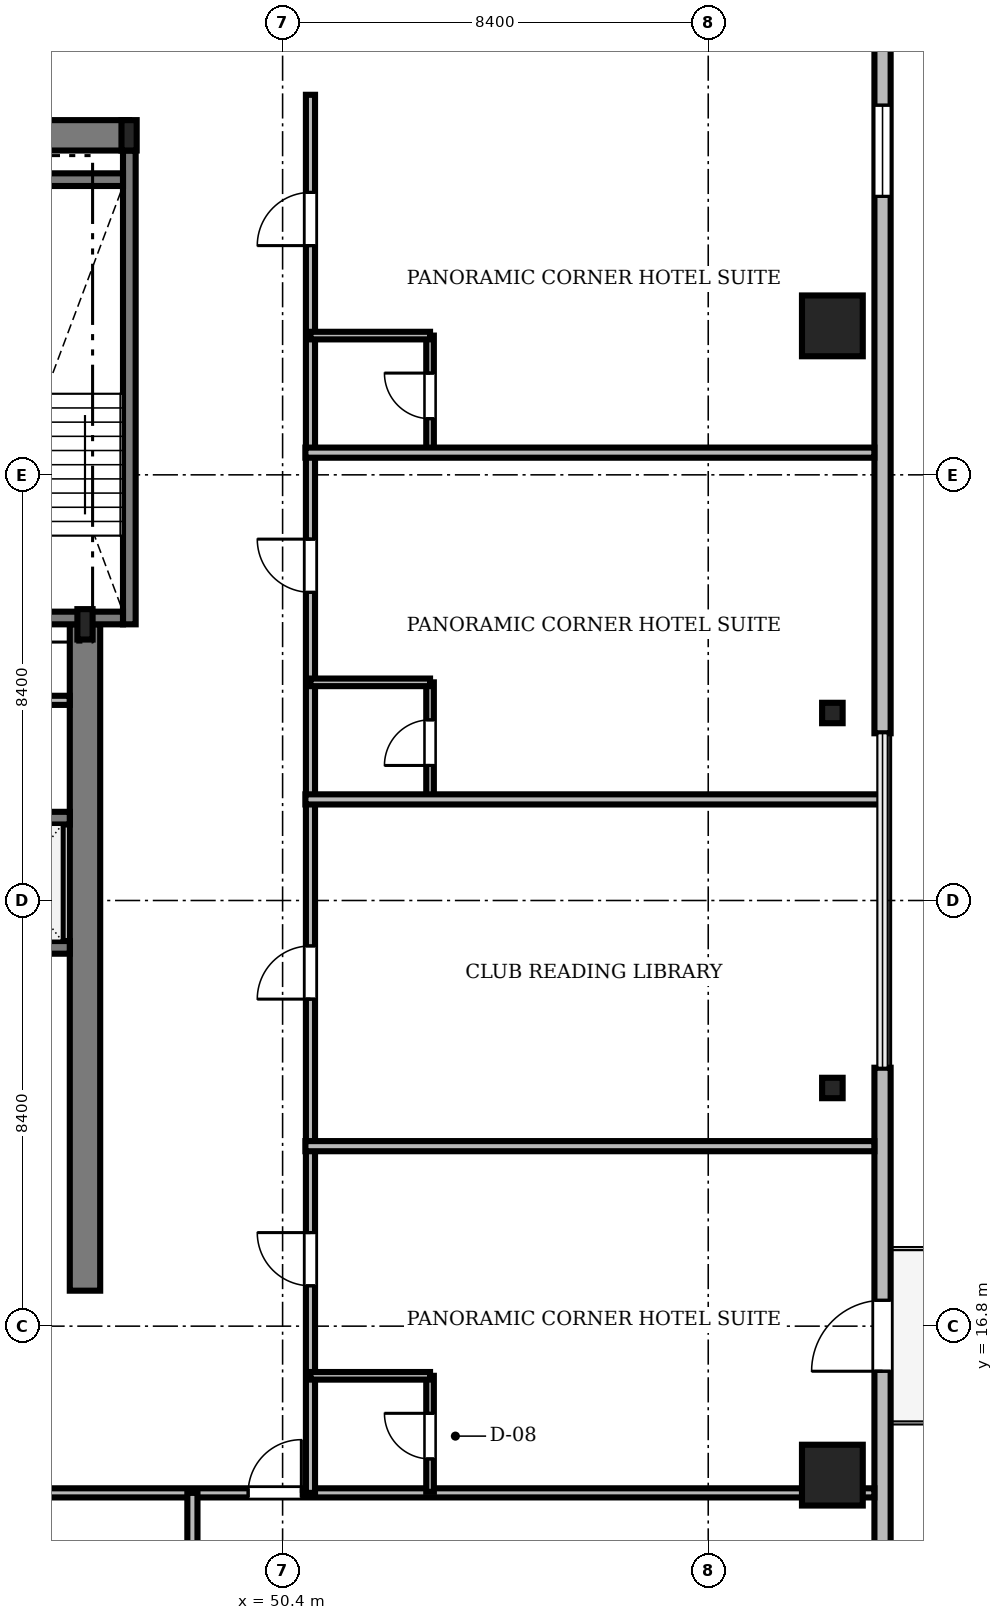
"""IFC4 building model, lengths in metres.
Left out: names, types, materials, properties, quantities, classifications, styles, units other than length and angle.
Written with IfcOpenShell. Run it as: python <this file> out.ifc"""

import sys

from ifc_helpers import new_model, si_unit, direction, frame, frame_2d, origin, origin_2d, place, context, subcontext, project, spatial, rectangle, i_section, extrude, source, transform, mapped, element, fill, save


model = new_model("IFC4")
c1 = context("Model", 3, precision=1e-05, world=origin(), true_north=direction((0.0, 1.0)))
c2 = subcontext(c1, "Body", "Model", "MODEL_VIEW")
j1 = project(units=[si_unit("LENGTHUNIT", "METRE"), si_unit("PLANEANGLEUNIT", "RADIAN")], contexts=[c1])
p1 = place(None, origin())
s1 = spatial("IfcSite", under=j1, at=p1, CompositionType="ELEMENT")
p2 = place(p1, origin())
s2 = spatial("IfcBuilding", under=s1, at=p2, CompositionType="ELEMENT")
p3 = place(p2, frame((0.0, 0.0, 250.6)))
s3 = spatial("IfcBuildingStorey", under=s2, at=p3, CompositionType="ELEMENT", Elevation=250.6)
m1 = source(origin(), c2, "Body", "SweptSolid", [
    extrude(rectangle(XDim=17.52, YDim=0.6, at=frame_2d((8.76, 0.0))), origin(), (0.0, 0.0, 1.0), 3.65),
])
p4 = place(p3, frame((29.85, 40.3, 0.0), z_axis=(0.0, 0.0, 1.0), x_axis=(1.0, 0.0, 0.0)))
e1 = element("IfcWall", 1, at=p4, inside=s3, PredefinedType="SHEAR", context=c2, shape_type="MappedRepresentation", body=[
    mapped(m1, transform((0.0, 0.0, 0.0), scale=1.0)),
])
m2 = source(origin(), c2, "Body", "SweptSolid", [
    extrude(rectangle(XDim=13.15, YDim=0.6, at=frame_2d((6.575, 0.0))), origin(), (0.0, 0.0, 1.0), 3.65),
])
p5 = place(p3, frame((46.5, 17.5, 0.0), z_axis=(0.0, 0.0, 1.0), x_axis=(0.0, 1.0, 0.0)))
e2 = element("IfcWall", 2, at=p5, inside=s3, PredefinedType="SHEAR", context=c2, shape_type="MappedRepresentation", body=[
    mapped(m2, transform((0.0, 0.0, 0.0), scale=1.0)),
])
m3 = source(origin(), c2, "Body", "SweptSolid", [
    extrude(i_section(OverallWidth=0.3, OverallDepth=0.6, WebThickness=0.015, FlangeThickness=0.03, FilletRadius=0.027, at=origin_2d()), origin(), (0.0, 0.0, 1.0), 3.65),
])
for number, where, z_axis, x_axis in (
    (3, (46.5, 30.65, 0.0), (0.0, 0.0, 1.0), (1.0, 0.0, 0.0)),
    (4, (47.37, 40.3, 0.0), (0.0, 0.0, 1.0), (1.0, 0.0, 0.0)),
):
    element("IfcColumn", number, at=place(p3, frame(where, z_axis=z_axis, x_axis=x_axis)), inside=s3, PredefinedType="COLUMN", context=c2, shape_type="MappedRepresentation", body=[
        mapped(m3, transform((0.0, 0.0, 0.0), scale=1.0)),
    ])
m4 = source(origin(), c2, "Body", "SweptSolid", [
    extrude(rectangle(XDim=1.2, YDim=1.2, at=origin_2d()), origin(), (0.0, 0.0, 1.0), 3.65),
])
for number, where, z_axis, x_axis in (
    (5, (61.25, 13.86, 0.0), (0.0, 0.0, 1.0), (1.0, 0.0, 0.0)),
    (6, (61.25, 36.54, 0.0), (0.0, 0.0, 1.0), (1.0, 0.0, 0.0)),
):
    element("IfcColumn", number, at=place(p3, frame(where, z_axis=z_axis, x_axis=x_axis)), inside=s3, PredefinedType="COLUMN", context=c2, shape_type="MappedRepresentation", body=[
        mapped(m4, transform((0.0, 0.0, 0.0), scale=1.0)),
    ])
m5 = source(origin(), c2, "Body", "SweptSolid", [
    extrude(i_section(OverallWidth=0.405, OverallDepth=0.403, WebThickness=0.018, FlangeThickness=0.028, FilletRadius=0.015, at=origin_2d()), origin(), (0.0, 0.0, 1.0), 3.65),
])
for number, where, z_axis, x_axis in (
    (7, (61.25, 21.5, 0.0), (0.0, 0.0, 1.0), (1.0, 0.0, 0.0)),
    (8, (61.25, 28.9, 0.0), (0.0, 0.0, 1.0), (1.0, 0.0, 0.0)),
):
    element("IfcColumn", number, at=place(p3, frame(where, z_axis=z_axis, x_axis=x_axis)), inside=s3, PredefinedType="COLUMN", context=c2, shape_type="MappedRepresentation", body=[
        mapped(m5, transform((0.0, 0.0, 0.0), scale=1.0)),
    ])
m6 = source(origin(), c2, "Body", "SweptSolid", [
    extrude(rectangle(XDim=15.6, YDim=0.32, at=frame_2d((7.8, 0.0))), origin(), (0.0, 0.0, 1.0), 3.65),
])
p6 = place(p3, frame((62.24, 6.3, 0.0), z_axis=(0.0, 0.0, 1.0), x_axis=(0.0, 1.0, 0.0)))
e9 = element("IfcWall", 9, at=p6, inside=s3, PredefinedType="SOLIDWALL", context=c2, shape_type="MappedRepresentation", body=[
    mapped(m6, transform((0.0, 0.0, 0.0), scale=1.0)),
])
m7 = source(origin(), c2, "Body", "SweptSolid", [
    extrude(rectangle(XDim=1.4, YDim=2.3, at=frame_2d((0.7, 1.15))), frame((0.0, 0.17, 0.0), z_axis=(0.0, -1.0, 0.0), x_axis=(1.0, 0.0, 0.0)), (0.0, 0.0, 1.0), 0.34),
])
p7 = place(p6, frame((9.61, 0.0, 0.0)))
e10 = element("IfcOpeningElement", 10, at=p7, cuts=e9, PredefinedType="OPENING", context=c2, shape_type="MappedRepresentation", body=[
    mapped(m7, transform((0.0, 0.0, 0.0), scale=1.0)),
])
m8 = source(origin(), c2, "Body", "SweptSolid", [
    extrude(rectangle(XDim=1.8, YDim=2.4, at=frame_2d((0.9, 1.2))), frame((0.0, 0.17, 0.0), z_axis=(0.0, -1.0, 0.0), x_axis=(1.0, 0.0, 0.0)), (0.0, 0.0, 1.0), 0.34),
])
p8 = place(p6, frame((3.205, 0.0, 0.72)))
e11 = element("IfcOpeningElement", 11, at=p8, cuts=e9, PredefinedType="OPENING", context=c2, shape_type="MappedRepresentation", body=[
    mapped(m8, transform((0.0, 0.0, 0.0), scale=1.0)),
])
m9 = source(origin(), c2, "Body", "SweptSolid", [
    extrude(rectangle(XDim=15.6, YDim=0.32, at=frame_2d((7.8, 0.0))), origin(), (0.0, 0.0, 1.0), 3.65),
])
p9 = place(p3, frame((62.24, 28.5, 0.0), z_axis=(0.0, 0.0, 1.0), x_axis=(0.0, 1.0, 0.0)))
e12 = element("IfcWall", 12, at=p9, inside=s3, PredefinedType="SOLIDWALL", context=c2, shape_type="MappedRepresentation", body=[
    mapped(m9, transform((0.0, 0.0, 0.0), scale=1.0)),
])
p10 = place(p9, frame((10.595, 0.0, 0.72)))
e13 = element("IfcOpeningElement", 13, at=p10, cuts=e12, PredefinedType="OPENING", context=c2, shape_type="MappedRepresentation", body=[
    mapped(m8, transform((0.0, 0.0, 0.0), scale=1.0)),
])
m10 = source(origin(), c2, "Body", "SweptSolid", [
    extrude(rectangle(XDim=9.35, YDim=0.25, at=frame_2d((4.675, 0.0))), origin(), (0.0, 0.0, 1.0), 3.75),
])
p11 = place(p3, frame((47.375, 30.65, 0.0), z_axis=(0.0, 0.0, 1.0), x_axis=(0.0, 1.0, 0.0)))
e14 = element("IfcWall", 14, at=p11, inside=s3, PredefinedType="SOLIDWALL", context=c2, shape_type="MappedRepresentation", body=[
    mapped(m10, transform((0.0, 0.0, 0.0), scale=1.0)),
])
m11 = source(origin(), c2, "Body", "SweptSolid", [
    extrude(rectangle(XDim=3.15, YDim=0.25, at=frame_2d((1.575, 0.0))), origin(), (0.0, 0.0, 1.0), 3.75),
])
p12 = place(p3, frame((44.1, 39.425, 0.0), z_axis=(0.0, 0.0, 1.0), x_axis=(1.0, 0.0, 0.0)))
e15 = element("IfcWall", 15, at=p12, inside=s3, PredefinedType="SOLIDWALL", context=c2, shape_type="MappedRepresentation", body=[
    mapped(m11, transform((0.0, 0.0, 0.0), scale=1.0)),
])
p13 = place(p3, frame((44.1, 30.775, 0.0), z_axis=(0.0, 0.0, 1.0), x_axis=(1.0, 0.0, 0.0)))
e16 = element("IfcWall", 16, at=p13, inside=s3, PredefinedType="SOLIDWALL", context=c2, shape_type="MappedRepresentation", body=[
    mapped(m11, transform((0.0, 0.0, 0.0), scale=1.0)),
])
m12 = source(origin(), c2, "Body", "SweptSolid", [
    extrude(rectangle(XDim=1.1, YDim=2.2, at=frame_2d((0.55, 1.1))), frame((0.0, 0.135, 0.0), z_axis=(0.0, -1.0, 0.0), x_axis=(1.0, 0.0, 0.0)), (0.0, 0.0, 1.0), 0.27),
])
p14 = place(p13, frame((0.35, 0.0, 0.0)))
e17 = element("IfcOpeningElement", 17, at=p14, cuts=e16, PredefinedType="OPENING", context=c2, shape_type="MappedRepresentation", body=[
    mapped(m12, transform((0.0, 0.0, 0.0), scale=1.0)),
])
m13 = source(origin(), c2, "Body", "SweptSolid", [
    extrude(rectangle(XDim=2.2, YDim=0.25, at=frame_2d((1.1, 0.0))), origin(), (0.0, 0.0, 1.0), 3.65),
])
p15 = place(p3, frame((44.0, 24.275, 0.0), z_axis=(0.0, 0.0, 1.0), x_axis=(1.0, 0.0, 0.0)))
e18 = element("IfcWall", 18, at=p15, inside=s3, PredefinedType="SOLIDWALL", context=c2, shape_type="MappedRepresentation", body=[
    mapped(m13, transform((0.0, 0.0, 0.0), scale=1.0)),
])
p16 = place(p3, frame((44.0, 26.825, 0.0), z_axis=(0.0, 0.0, 1.0), x_axis=(1.0, 0.0, 0.0)))
e19 = element("IfcWall", 19, at=p16, inside=s3, PredefinedType="SOLIDWALL", context=c2, shape_type="MappedRepresentation", body=[
    mapped(m13, transform((0.0, 0.0, 0.0), scale=1.0)),
])
m14 = source(origin(), c2, "Body", "SweptSolid", [
    extrude(rectangle(XDim=1.3, YDim=2.3, at=frame_2d((0.65, 1.15))), frame((0.0, 0.135, 0.0), z_axis=(0.0, -1.0, 0.0), x_axis=(1.0, 0.0, 0.0)), (0.0, 0.0, 1.0), 0.27),
])
p17 = place(p16, frame((0.45, 0.0, 0.0)))
e20 = element("IfcOpeningElement", 20, at=p17, cuts=e19, PredefinedType="OPENING", context=c2, shape_type="MappedRepresentation", body=[
    mapped(m14, transform((0.0, 0.0, 0.0), scale=1.0)),
])
m15 = source(origin(), c2, "Body", "SweptSolid", [
    extrude(rectangle(XDim=46.156, YDim=0.18, at=frame_2d((23.078, 0.0))), origin(), (0.0, 0.0, 1.0), 2.892),
])
p18 = place(p3, frame((15.922, 13.51, 0.0), z_axis=(0.0, 0.0, 1.0), x_axis=(1.0, 0.0, 0.0)))
e21 = element("IfcWall", 21, at=p18, inside=s3, PredefinedType="PARTITIONING", context=c2, shape_type="MappedRepresentation", body=[
    mapped(m15, transform((0.0, 0.0, 0.0), scale=1.0)),
])
m16 = source(origin(), c2, "Body", "SweptSolid", [
    extrude(rectangle(XDim=1.05, YDim=2.2, at=frame_2d((0.525, 1.1))), frame((0.0, 0.1, 0.0), z_axis=(0.0, -1.0, 0.0), x_axis=(1.0, 0.0, 0.0)), (0.0, 0.0, 1.0), 0.2),
])
p19 = place(p18, frame((7.298, 0.0, 0.0)))
e22 = element("IfcOpeningElement", 22, at=p19, cuts=e21, PredefinedType="OPENING", context=c2, shape_type="MappedRepresentation", body=[
    mapped(m16, transform((0.0, 0.0, 0.0), scale=1.0)),
])
p20 = place(p18, frame((10.384, 0.0, 0.0)))
e23 = element("IfcOpeningElement", 23, at=p20, cuts=e21, PredefinedType="OPENING", context=c2, shape_type="MappedRepresentation", body=[
    mapped(m16, transform((0.0, 0.0, 0.0), scale=1.0)),
])
p21 = place(p18, frame((15.647, 0.0, 0.0)))
e24 = element("IfcOpeningElement", 24, at=p21, cuts=e21, PredefinedType="OPENING", context=c2, shape_type="MappedRepresentation", body=[
    mapped(m16, transform((0.0, 0.0, 0.0), scale=1.0)),
])
p22 = place(p18, frame((21.659, 0.0, 0.0)))
e25 = element("IfcOpeningElement", 25, at=p22, cuts=e21, PredefinedType="OPENING", context=c2, shape_type="MappedRepresentation", body=[
    mapped(m16, transform((0.0, 0.0, 0.0), scale=1.0)),
])
p23 = place(p18, frame((28.422, 0.0, 0.0)))
e26 = element("IfcOpeningElement", 26, at=p23, cuts=e21, PredefinedType="OPENING", context=c2, shape_type="MappedRepresentation", body=[
    mapped(m16, transform((0.0, 0.0, 0.0), scale=1.0)),
])
p24 = place(p18, frame((33.798, 0.0, 0.0)))
e27 = element("IfcOpeningElement", 27, at=p24, cuts=e21, PredefinedType="OPENING", context=c2, shape_type="MappedRepresentation", body=[
    mapped(m16, transform((0.0, 0.0, 0.0), scale=1.0)),
])
m17 = source(origin(), c2, "Body", "SweptSolid", [
    extrude(rectangle(XDim=27.59, YDim=0.18, at=frame_2d((13.795, 0.0))), origin(), (0.0, 0.0, 1.0), 3.092),
])
p25 = place(p3, frame((50.95, 13.51, 0.0), z_axis=(0.0, 0.0, 1.0), x_axis=(0.0, 1.0, 0.0)))
e28 = element("IfcWall", 28, at=p25, inside=s3, PredefinedType="PARTITIONING", context=c2, shape_type="MappedRepresentation", body=[
    mapped(m17, transform((0.0, 0.0, 0.0), scale=1.0)),
])
p26 = place(p25, frame((4.086, 0.0, 0.0)))
e29 = element("IfcOpeningElement", 29, at=p26, cuts=e28, PredefinedType="OPENING", context=c2, shape_type="MappedRepresentation", body=[
    mapped(m16, transform((0.0, 0.0, 0.0), scale=1.0)),
])
p27 = place(p25, frame((9.744, 0.0, 0.0)))
e30 = element("IfcOpeningElement", 30, at=p27, cuts=e28, PredefinedType="OPENING", context=c2, shape_type="MappedRepresentation", body=[
    mapped(m16, transform((0.0, 0.0, 0.0), scale=1.0)),
])
p28 = place(p25, frame((17.771, 0.0, 0.0)))
e31 = element("IfcOpeningElement", 31, at=p28, cuts=e28, PredefinedType="OPENING", context=c2, shape_type="MappedRepresentation", body=[
    mapped(m16, transform((0.0, 0.0, 0.0), scale=1.0)),
])
p29 = place(p25, frame((24.614, 0.0, 0.0)))
e32 = element("IfcOpeningElement", 32, at=p29, cuts=e28, PredefinedType="OPENING", context=c2, shape_type="MappedRepresentation", body=[
    mapped(m16, transform((0.0, 0.0, 0.0), scale=1.0)),
])
m18 = source(origin(), c2, "Body", "SweptSolid", [
    extrude(rectangle(XDim=4.648, YDim=0.18, at=frame_2d((2.324, 0.0))), origin(), (0.0, 0.0, 1.0), 3.282),
])
p30 = place(p3, frame((41.55, 29.15, 0.0), z_axis=(0.0, 0.0, 1.0), x_axis=(1.0, 0.0, 0.0)))
e33 = element("IfcWall", 33, at=p30, inside=s3, PredefinedType="PARTITIONING", context=c2, shape_type="MappedRepresentation", body=[
    mapped(m18, transform((0.0, 0.0, 0.0), scale=1.0)),
])
m19 = source(origin(), c2, "Body", "SweptSolid", [
    extrude(rectangle(XDim=1.2, YDim=2.2, at=frame_2d((0.6, 1.1))), frame((0.0, 0.1, 0.0), z_axis=(0.0, -1.0, 0.0), x_axis=(1.0, 0.0, 0.0)), (0.0, 0.0, 1.0), 0.2),
])
p31 = place(p30, frame((1.6, 0.0, 0.0)))
e34 = element("IfcOpeningElement", 34, at=p31, cuts=e33, PredefinedType="OPENING", context=c2, shape_type="MappedRepresentation", body=[
    mapped(m19, transform((0.0, 0.0, 0.0), scale=1.0)),
])
m20 = source(origin(), c2, "Body", "SweptSolid", [
    extrude(rectangle(XDim=2.29, YDim=0.15, at=frame_2d((1.145, 0.0))), origin(), (0.0, 0.0, 1.0), 3.092),
])
p32 = place(p3, frame((53.31, 13.53, 0.0), z_axis=(0.0, 0.0, 1.0), x_axis=(0.0, 1.0, 0.0)))
e35 = element("IfcWall", 35, at=p32, inside=s3, PredefinedType="PARTITIONING", context=c2, shape_type="MappedRepresentation", body=[
    mapped(m20, transform((0.0, 0.0, 0.0), scale=1.0)),
])
m21 = source(origin(), c2, "Body", "SweptSolid", [
    extrude(rectangle(XDim=0.9, YDim=2.1, at=frame_2d((0.45, 1.05))), frame((0.0, 0.085, 0.0), z_axis=(0.0, -1.0, 0.0), x_axis=(1.0, 0.0, 0.0)), (0.0, 0.0, 1.0), 0.17),
])
p33 = place(p32, frame((0.65, 0.0, 0.0)))
e36 = element("IfcOpeningElement", 36, at=p33, cuts=e35, PredefinedType="OPENING", context=c2, shape_type="MappedRepresentation", body=[
    mapped(m21, transform((0.0, 0.0, 0.0), scale=1.0)),
])
m22 = source(origin(), c2, "Body", "SweptSolid", [
    extrude(rectangle(XDim=2.29, YDim=0.15, at=frame_2d((1.145, 0.0))), origin(), (0.0, 0.0, 1.0), 3.65),
])
p34 = place(p3, frame((53.31, 27.215, 0.0), z_axis=(0.0, 0.0, 1.0), x_axis=(0.0, 1.0, 0.0)))
e37 = element("IfcWall", 37, at=p34, inside=s3, PredefinedType="PARTITIONING", context=c2, shape_type="MappedRepresentation", body=[
    mapped(m22, transform((0.0, 0.0, 0.0), scale=1.0)),
])
p35 = place(p34, frame((0.65, 0.0, 0.0)))
e38 = element("IfcOpeningElement", 38, at=p35, cuts=e37, PredefinedType="OPENING", context=c2, shape_type="MappedRepresentation", body=[
    mapped(m21, transform((0.0, 0.0, 0.0), scale=1.0)),
])
p36 = place(p3, frame((53.31, 34.058, 0.0), z_axis=(0.0, 0.0, 1.0), x_axis=(0.0, 1.0, 0.0)))
e39 = element("IfcWall", 39, at=p36, inside=s3, PredefinedType="PARTITIONING", context=c2, shape_type="MappedRepresentation", body=[
    mapped(m22, transform((0.0, 0.0, 0.0), scale=1.0)),
])
p37 = place(p36, frame((0.65, 0.0, 0.0)))
e40 = element("IfcOpeningElement", 40, at=p37, cuts=e39, PredefinedType="OPENING", context=c2, shape_type="MappedRepresentation", body=[
    mapped(m21, transform((0.0, 0.0, 0.0), scale=1.0)),
])
m23 = source(origin(), c2, "Body", "SweptSolid", [
    extrude(rectangle(XDim=11.388, YDim=0.2, at=frame_2d((5.694, 0.0))), origin(), (0.0, 0.0, 1.0), 2.892),
])
p38 = place(p3, frame((48.62, 2.122, 0.0), z_axis=(0.0, 0.0, 1.0), x_axis=(0.0, 1.0, 0.0)))
e41 = element("IfcWall", 41, at=p38, inside=s3, PredefinedType="PARTITIONING", context=c2, shape_type="MappedRepresentation", body=[
    mapped(m23, transform((0.0, 0.0, 0.0), scale=1.0)),
])
m24 = source(origin(), c2, "Body", "SweptSolid", [
    extrude(rectangle(XDim=11.228, YDim=0.2, at=frame_2d((5.614, 0.0))), origin(), (0.0, 0.0, 1.0), 2.892),
])
p39 = place(p3, frame((50.85, 20.352, 0.0), z_axis=(0.0, 0.0, 1.0), x_axis=(1.0, 0.0, 0.0)))
e42 = element("IfcWall", 42, at=p39, inside=s3, PredefinedType="PARTITIONING", context=c2, shape_type="MappedRepresentation", body=[
    mapped(m24, transform((0.0, 0.0, 0.0), scale=1.0)),
])
m25 = source(origin(), c2, "Body", "SweptSolid", [
    extrude(rectangle(XDim=11.42, YDim=0.2, at=frame_2d((5.71, 0.0))), origin(), (0.0, 0.0, 1.0), 2.892),
])
p40 = place(p3, frame((50.85, 27.195, 0.0), z_axis=(0.0, 0.0, 1.0), x_axis=(1.0, 0.0, 0.0)))
e43 = element("IfcWall", 43, at=p40, inside=s3, PredefinedType="PARTITIONING", context=c2, shape_type="MappedRepresentation", body=[
    mapped(m25, transform((0.0, 0.0, 0.0), scale=1.0)),
])
p41 = place(p3, frame((50.85, 34.038, 0.0), z_axis=(0.0, 0.0, 1.0), x_axis=(1.0, 0.0, 0.0)))
e44 = element("IfcWall", 44, at=p41, inside=s3, PredefinedType="PARTITIONING", context=c2, shape_type="MappedRepresentation", body=[
    mapped(m24, transform((0.0, 0.0, 0.0), scale=1.0)),
])
m26 = source(origin(), c2, "Body", "SweptSolid", [
    extrude(rectangle(XDim=2.36, YDim=0.15, at=frame_2d((1.18, 0.0))), origin(), (0.0, 0.0, 1.0), 3.65),
])
for number, where, z_axis, x_axis in (
    (45, (50.95, 15.82, 0.0), (0.0, 0.0, 1.0), (1.0, 0.0, 0.0)),
    (46, (50.95, 29.505, 0.0), (0.0, 0.0, 1.0), (1.0, 0.0, 0.0)),
    (47, (50.95, 36.348, 0.0), (0.0, 0.0, 1.0), (1.0, 0.0, 0.0)),
):
    element("IfcWall", number, at=place(p3, frame(where, z_axis=z_axis, x_axis=x_axis)), inside=s3, PredefinedType="PARTITIONING", context=c2, shape_type="MappedRepresentation", body=[
        mapped(m26, transform((0.0, 0.0, 0.0), scale=1.0)),
    ])
m27 = source(origin(), c2, "Body", "SweptSolid", [
    extrude(rectangle(XDim=1.4, YDim=2.3, at=frame_2d((0.7, 1.15))), frame((0.0, 0.025, 0.0), z_axis=(0.0, -1.0, 0.0), x_axis=(1.0, 0.0, 0.0)), (0.0, 0.0, 1.0), 0.05),
])
p42 = place(p7, frame((1.4, 0.0, 0.0), z_axis=(0.0, 0.0, 1.0), x_axis=(-1.0, 0.0, 0.0)))
e48 = element("IfcDoor", 48, at=p42, inside=s3, OperationType="DOUBLE_DOOR_SLIDING", PredefinedType="DOOR", context=c2, shape_type="MappedRepresentation", body=[
    mapped(m27, transform((0.0, 0.0, 0.0), scale=1.0)),
])
fill(e10, e48)
m28 = source(origin(), c2, "Body", "SweptSolid", [
    extrude(rectangle(XDim=1.8, YDim=2.4, at=frame_2d((0.9, 1.2))), frame((0.0, 0.03, 0.0), z_axis=(0.0, -1.0, 0.0), x_axis=(1.0, 0.0, 0.0)), (0.0, 0.0, 1.0), 0.06),
])
p43 = place(p10, origin())
e49 = element("IfcWindow", 49, at=p43, inside=s3, PartitioningType="SINGLE_PANEL", PredefinedType="WINDOW", context=c2, shape_type="MappedRepresentation", body=[
    mapped(m28, transform((0.0, 0.0, 0.0), scale=1.0)),
])
fill(e13, e49)
m29 = source(origin(), c2, "Body", "SweptSolid", [
    extrude(rectangle(XDim=1.05, YDim=2.2, at=frame_2d((0.525, 1.1))), frame((0.0, 0.025, 0.0), z_axis=(0.0, -1.0, 0.0), x_axis=(1.0, 0.0, 0.0)), (0.0, 0.0, 1.0), 0.05),
])
p44 = place(p24, origin())
e50 = element("IfcDoor", 50, at=p44, inside=s3, OperationType="SINGLE_SWING_RIGHT", PredefinedType="DOOR", context=c2, shape_type="MappedRepresentation", body=[
    mapped(m29, transform((0.0, 0.0, 0.0), scale=1.0)),
])
fill(e27, e50)
p45 = place(p26, origin())
e51 = element("IfcDoor", 51, at=p45, inside=s3, OperationType="SINGLE_SWING_RIGHT", PredefinedType="DOOR", context=c2, shape_type="MappedRepresentation", body=[
    mapped(m29, transform((0.0, 0.0, 0.0), scale=1.0)),
])
fill(e29, e51)
p46 = place(p27, origin())
e52 = element("IfcDoor", 52, at=p46, inside=s3, OperationType="SINGLE_SWING_LEFT", PredefinedType="DOOR", context=c2, shape_type="MappedRepresentation", body=[
    mapped(m29, transform((0.0, 0.0, 0.0), scale=1.0)),
])
fill(e30, e52)
p47 = place(p28, origin())
e53 = element("IfcDoor", 53, at=p47, inside=s3, OperationType="SINGLE_SWING_RIGHT", PredefinedType="DOOR", context=c2, shape_type="MappedRepresentation", body=[
    mapped(m29, transform((0.0, 0.0, 0.0), scale=1.0)),
])
fill(e31, e53)
p48 = place(p29, origin())
e54 = element("IfcDoor", 54, at=p48, inside=s3, OperationType="SINGLE_SWING_LEFT", PredefinedType="DOOR", context=c2, shape_type="MappedRepresentation", body=[
    mapped(m29, transform((0.0, 0.0, 0.0), scale=1.0)),
])
fill(e32, e54)
m30 = source(origin(), c2, "Body", "SweptSolid", [
    extrude(rectangle(XDim=0.9, YDim=2.1, at=frame_2d((0.45, 1.05))), frame((0.0, 0.025, 0.0), z_axis=(0.0, -1.0, 0.0), x_axis=(1.0, 0.0, 0.0)), (0.0, 0.0, 1.0), 0.05),
])
p49 = place(p33, origin())
e55 = element("IfcDoor", 55, at=p49, inside=s3, OperationType="SINGLE_SWING_RIGHT", PredefinedType="DOOR", context=c2, shape_type="MappedRepresentation", body=[
    mapped(m30, transform((0.0, 0.0, 0.0), scale=1.0)),
])
fill(e36, e55)
p50 = place(p35, origin())
e56 = element("IfcDoor", 56, at=p50, inside=s3, OperationType="SINGLE_SWING_LEFT", PredefinedType="DOOR", context=c2, shape_type="MappedRepresentation", body=[
    mapped(m30, transform((0.0, 0.0, 0.0), scale=1.0)),
])
fill(e38, e56)
p51 = place(p37, origin())
e57 = element("IfcDoor", 57, at=p51, inside=s3, OperationType="SINGLE_SWING_RIGHT", PredefinedType="DOOR", context=c2, shape_type="MappedRepresentation", body=[
    mapped(m30, transform((0.0, 0.0, 0.0), scale=1.0)),
])
fill(e40, e57)
save(model, sys.argv[1])
